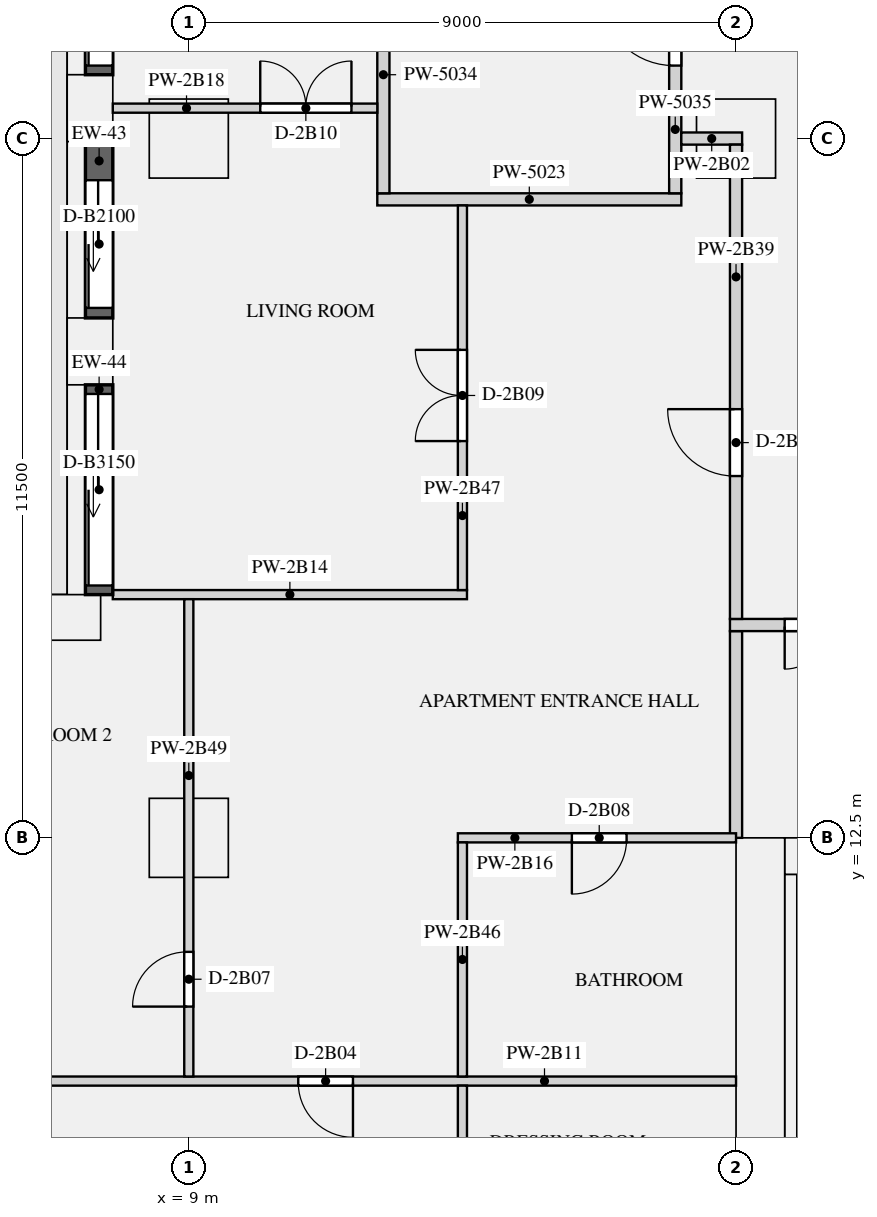
"""IFC4 building model, lengths in metres.
Left out: names, types, materials, properties, quantities, classifications, styles, units other than length and angle.
Written with IfcOpenShell. Run it as: python <this file> out.ifc"""

import sys

from ifc_helpers import new_model, si_unit, direction, frame, frame_2d, origin, origin_2d, place, context, subcontext, project, spatial, rectangle, extrude, element, fill, save


model = new_model("IFC4")
c1 = context("Model", 3, precision=1e-05, world=origin(), true_north=direction((0.0, 1.0)))
c2 = subcontext(c1, "Body", "Model", "MODEL_VIEW")
j1 = project(units=[si_unit("LENGTHUNIT", "METRE"), si_unit("PLANEANGLEUNIT", "RADIAN")], contexts=[c1])
p1 = place(None, origin())
s1 = spatial("IfcSite", under=j1, at=p1, CompositionType="ELEMENT")
p2 = place(p1, origin())
s2 = spatial("IfcBuilding", under=s1, at=p2, CompositionType="ELEMENT")
p3 = place(p2, frame((0.0, 0.0, 93.0)))
s3 = spatial("IfcBuildingStorey", under=s2, at=p3, CompositionType="ELEMENT", Elevation=93.0)
for number, where, z_axis, x_axis in (
    (1, (7.375, 24.5, 0.0), (0.0, 0.0, 1.0), (0.0, -1.0, 0.0)),
    (2, (7.375, 20.5, 0.0), (0.0, 0.0, 1.0), (0.0, -1.0, 0.0)),
    (3, (7.0, 16.125, 0.0), (0.0, 0.0, 1.0), (-1.0, 0.0, 0.0)),
):
    element("IfcColumn", number, at=place(p3, frame(where, z_axis=z_axis, x_axis=x_axis)), inside=s3, PredefinedType="USERDEFINED", context=c2, shape_type="SweptSolid", body=[
        extrude(rectangle(XDim=1.1, YDim=0.75, at=origin_2d()), origin(), (0.0, 0.0, 1.0), 3.15),
    ])
for number, where, z_axis, x_axis in (
    (4, (9.0, 24.0, 0.0), (0.0, 0.0, 1.0), (1.0, 0.0, 0.0)),
    (5, (18.0, 24.0, 0.0), (0.0, 0.0, 1.0), (1.0, 0.0, 0.0)),
    (6, (9.0, 12.5, 0.0), (0.0, 0.0, 1.0), (1.0, 0.0, 0.0)),
):
    element("IfcColumn", number, at=place(p3, frame(where, z_axis=z_axis, x_axis=x_axis)), inside=s3, PredefinedType="COLUMN", context=c2, shape_type="SweptSolid", body=[
        extrude(rectangle(XDim=1.3, YDim=1.3, at=origin_2d()), origin(), (0.0, 0.0, 1.0), 3.15),
    ])
p4 = place(p3, frame((18.4, 0.0, 0.0), z_axis=(0.0, 0.0, 1.0), x_axis=(0.0, 1.0, 0.0)))
e7 = element("IfcWall", 7, at=p4, inside=s3, PredefinedType="SHEAR", context=c2, shape_type="SweptSolid", body=[
    extrude(rectangle(XDim=12.5, YDim=0.8, at=frame_2d((6.25, 0.0))), origin(), (0.0, 0.0, 1.0), 3.15),
])
p5 = place(p3, frame((18.8, 12.2, 0.0), z_axis=(0.0, 0.0, 1.0), x_axis=(1.0, 0.0, 0.0)))
e8 = element("IfcWall", 8, at=p5, inside=s3, PredefinedType="SHEAR", context=c2, shape_type="SweptSolid", body=[
    extrude(rectangle(XDim=34.4, YDim=0.6, at=frame_2d((17.2, 0.0))), origin(), (0.0, 0.0, 1.0), 3.15),
])
p6 = place(p5, frame((24.375, 0.0, 0.0)))
e9 = element("IfcOpeningElement", 9, at=p6, cuts=e8, PredefinedType="OPENING", context=c2, shape_type="SweptSolid", body=[
    extrude(rectangle(XDim=1.1, YDim=2.1, at=frame_2d((0.55, 1.05))), frame((0.0, 0.31, 0.0), z_axis=(0.0, -1.0, 0.0), x_axis=(1.0, 0.0, 0.0)), (0.0, 0.0, 1.0), 0.62),
])
p7 = place(p5, frame((26.625, 0.0, 0.0)))
e10 = element("IfcOpeningElement", 10, at=p7, cuts=e8, PredefinedType="OPENING", context=c2, shape_type="SweptSolid", body=[
    extrude(rectangle(XDim=1.1, YDim=2.1, at=frame_2d((0.55, 1.05))), frame((0.0, 0.31, 0.0), z_axis=(0.0, -1.0, 0.0), x_axis=(1.0, 0.0, 0.0)), (0.0, 0.0, 1.0), 0.62),
])
p8 = place(p5, frame((28.875, 0.0, 0.0)))
e11 = element("IfcOpeningElement", 11, at=p8, cuts=e8, PredefinedType="OPENING", context=c2, shape_type="SweptSolid", body=[
    extrude(rectangle(XDim=1.1, YDim=2.1, at=frame_2d((0.55, 1.05))), frame((0.0, 0.31, 0.0), z_axis=(0.0, -1.0, 0.0), x_axis=(1.0, 0.0, 0.0)), (0.0, 0.0, 1.0), 0.62),
])
p9 = place(p5, frame((4.75, 0.0, 0.0)))
e12 = element("IfcOpeningElement", 12, at=p9, cuts=e8, PredefinedType="OPENING", context=c2, shape_type="SweptSolid", body=[
    extrude(rectangle(XDim=0.9, YDim=2.1, at=frame_2d((0.45, 1.05))), frame((0.0, 0.31, 0.0), z_axis=(0.0, -1.0, 0.0), x_axis=(1.0, 0.0, 0.0)), (0.0, 0.0, 1.0), 0.62),
])
p10 = place(p5, frame((18.25, 0.0, 0.0)))
e13 = element("IfcOpeningElement", 13, at=p10, cuts=e8, PredefinedType="OPENING", context=c2, shape_type="SweptSolid", body=[
    extrude(rectangle(XDim=0.9, YDim=2.1, at=frame_2d((0.45, 1.05))), frame((0.0, 0.31, 0.0), z_axis=(0.0, -1.0, 0.0), x_axis=(1.0, 0.0, 0.0)), (0.0, 0.0, 1.0), 0.62),
])
p11 = place(p5, frame((1.35, 0.0, 0.0)))
e14 = element("IfcOpeningElement", 14, at=p11, cuts=e8, PredefinedType="OPENING", context=c2, shape_type="SweptSolid", body=[
    extrude(rectangle(XDim=1.2, YDim=2.1, at=frame_2d((0.6, 1.05))), frame((0.0, 0.31, 0.0), z_axis=(0.0, -1.0, 0.0), x_axis=(1.0, 0.0, 0.0)), (0.0, 0.0, 1.0), 0.62),
])
p12 = place(p5, frame((31.85, 0.0, 0.0)))
e15 = element("IfcOpeningElement", 15, at=p12, cuts=e8, PredefinedType="OPENING", context=c2, shape_type="SweptSolid", body=[
    extrude(rectangle(XDim=1.2, YDim=2.1, at=frame_2d((0.6, 1.05))), frame((0.0, 0.31, 0.0), z_axis=(0.0, -1.0, 0.0), x_axis=(1.0, 0.0, 0.0)), (0.0, 0.0, 1.0), 0.62),
])
p13 = place(p3, frame((18.9, 1.0, 0.0), z_axis=(0.0, 0.0, 1.0), x_axis=(0.0, 1.0, 0.0)))
e16 = element("IfcWall", 16, at=p13, inside=s3, PredefinedType="SHEAR", context=c2, shape_type="SweptSolid", body=[
    extrude(rectangle(XDim=10.9, YDim=0.2, at=frame_2d((5.45, 0.0))), origin(), (0.0, 0.0, 1.0), 3.15),
])
p14 = place(p3, frame((7.525, 27.95, 0.0), z_axis=(0.0, 0.0, 1.0), x_axis=(0.0, -1.0, 0.0)))
e17 = element("IfcWall", 17, at=p14, inside=s3, PredefinedType="SOLIDWALL", context=c2, shape_type="SweptSolid", body=[
    extrude(rectangle(XDim=2.9, YDim=0.45, at=frame_2d((1.45, 0.0))), origin(), (0.0, 0.0, 1.0), 2.83),
])
p15 = place(p14, frame((0.15, 0.0, 0.0)))
e18 = element("IfcOpeningElement", 18, at=p15, cuts=e17, PredefinedType="OPENING", context=c2, shape_type="SweptSolid", body=[
    extrude(rectangle(XDim=2.6, YDim=2.3, at=frame_2d((1.3, 1.15))), frame((0.0, 0.235, 0.0), z_axis=(0.0, -1.0, 0.0), x_axis=(1.0, 0.0, 0.0)), (0.0, 0.0, 1.0), 0.47),
])
p16 = place(p3, frame((7.525, 23.95, 0.0), z_axis=(0.0, 0.0, 1.0), x_axis=(0.0, -1.0, 0.0)))
e19 = element("IfcWall", 19, at=p16, inside=s3, PredefinedType="SOLIDWALL", context=c2, shape_type="SweptSolid", body=[
    extrude(rectangle(XDim=2.9, YDim=0.45, at=frame_2d((1.45, 0.0))), origin(), (0.0, 0.0, 1.0), 2.83),
])
p17 = place(p16, frame((0.635, 0.0, 0.0)))
e20 = element("IfcOpeningElement", 20, at=p17, cuts=e19, PredefinedType="OPENING", context=c2, shape_type="SweptSolid", body=[
    extrude(rectangle(XDim=2.1, YDim=2.3, at=frame_2d((1.05, 1.15))), frame((0.0, 0.235, 0.0), z_axis=(0.0, -1.0, 0.0), x_axis=(1.0, 0.0, 0.0)), (0.0, 0.0, 1.0), 0.47),
])
p18 = place(p3, frame((7.525, 19.95, 0.0), z_axis=(0.0, 0.0, 1.0), x_axis=(0.0, -1.0, 0.0)))
e21 = element("IfcWall", 21, at=p18, inside=s3, PredefinedType="SOLIDWALL", context=c2, shape_type="SweptSolid", body=[
    extrude(rectangle(XDim=3.45, YDim=0.45, at=frame_2d((1.725, 0.0))), origin(), (0.0, 0.0, 1.0), 2.83),
])
p19 = place(p18, frame((0.15, 0.0, 0.0)))
e22 = element("IfcOpeningElement", 22, at=p19, cuts=e21, PredefinedType="OPENING", context=c2, shape_type="SweptSolid", body=[
    extrude(rectangle(XDim=3.15, YDim=2.3, at=frame_2d((1.575, 1.15))), frame((0.0, 0.235, 0.0), z_axis=(0.0, -1.0, 0.0), x_axis=(1.0, 0.0, 0.0)), (0.0, 0.0, 1.0), 0.47),
])
p20 = place(p3, frame((12.1, 23.0, 0.0), z_axis=(0.0, 0.0, 1.0), x_axis=(1.0, 0.0, 0.0)))
e23 = element("IfcWall", 23, at=p20, inside=s3, PredefinedType="PARTITIONING", context=c2, shape_type="SweptSolid", body=[
    extrude(rectangle(XDim=5.0, YDim=0.2, at=frame_2d((2.5, 0.0))), origin(), (0.0, 0.0, 1.0), 2.83),
])
p21 = place(p3, frame((18.0, 12.5, 0.0), z_axis=(0.0, 0.0, 1.0), x_axis=(0.0, 1.0, 0.0)))
e24 = element("IfcWall", 24, at=p21, inside=s3, PredefinedType="PARTITIONING", context=c2, shape_type="SweptSolid", body=[
    extrude(rectangle(XDim=3.4, YDim=0.2, at=frame_2d((1.7, 0.0))), origin(), (0.0, 0.0, 1.0), 2.83),
])
p22 = place(p3, frame((12.2, 23.1, 0.0), z_axis=(0.0, 0.0, 1.0), x_axis=(0.0, 1.0, 0.0)))
e25 = element("IfcWall", 25, at=p22, inside=s3, PredefinedType="PARTITIONING", context=c2, shape_type="SweptSolid", body=[
    extrude(rectangle(XDim=3.9, YDim=0.2, at=frame_2d((1.95, 0.0))), origin(), (0.0, 0.0, 1.0), 2.83),
])
p23 = place(p3, frame((17.0, 23.1, 0.0), z_axis=(0.0, 0.0, 1.0), x_axis=(0.0, 1.0, 0.0)))
e26 = element("IfcWall", 26, at=p23, inside=s3, PredefinedType="PARTITIONING", context=c2, shape_type="SweptSolid", body=[
    extrude(rectangle(XDim=3.8, YDim=0.2, at=frame_2d((1.9, 0.0))), origin(), (0.0, 0.0, 1.0), 2.83),
])
p24 = place(p23, frame((2.1, 0.0, 0.0)))
e27 = element("IfcOpeningElement", 27, at=p24, cuts=e26, PredefinedType="OPENING", context=c2, shape_type="SweptSolid", body=[
    extrude(rectangle(XDim=1.2, YDim=2.1, at=frame_2d((0.6, 1.05))), frame((0.0, 0.11, 0.0), z_axis=(0.0, -1.0, 0.0), x_axis=(1.0, 0.0, 0.0)), (0.0, 0.0, 1.0), 0.22),
])
p25 = place(p3, frame((17.1, 24.0, 0.0), z_axis=(0.0, 0.0, 1.0), x_axis=(1.0, 0.0, 0.0)))
e28 = element("IfcWall", 28, at=p25, inside=s3, PredefinedType="PARTITIONING", context=c2, shape_type="SweptSolid", body=[
    extrude(rectangle(XDim=1.0, YDim=0.2, at=frame_2d((0.5, 0.0))), origin(), (0.0, 0.0, 1.0), 2.83),
])
p26 = place(p3, frame((5.25, 8.5, 0.0), z_axis=(0.0, 0.0, 1.0), x_axis=(1.0, 0.0, 0.0)))
e29 = element("IfcWall", 29, at=p26, inside=s3, PredefinedType="PARTITIONING", context=c2, shape_type="SweptSolid", body=[
    extrude(rectangle(XDim=12.75, YDim=0.15, at=frame_2d((6.375, 0.0))), origin(), (0.0, 0.0, 1.0), 2.83),
])
p27 = place(p26, frame((5.55, 0.0, 0.0)))
e30 = element("IfcOpeningElement", 30, at=p27, cuts=e29, PredefinedType="OPENING", context=c2, shape_type="SweptSolid", body=[
    extrude(rectangle(XDim=0.9, YDim=2.1, at=frame_2d((0.45, 1.05))), frame((0.0, 0.085, 0.0), z_axis=(0.0, -1.0, 0.0), x_axis=(1.0, 0.0, 0.0)), (0.0, 0.0, 1.0), 0.17),
])
p28 = place(p3, frame((7.75, 16.5, 0.0), z_axis=(0.0, 0.0, 1.0), x_axis=(1.0, 0.0, 0.0)))
e31 = element("IfcWall", 31, at=p28, inside=s3, PredefinedType="PARTITIONING", context=c2, shape_type="SweptSolid", body=[
    extrude(rectangle(XDim=5.825, YDim=0.15, at=frame_2d((2.913, 0.0))), origin(), (0.0, 0.0, 1.0), 2.83),
])
p29 = place(p3, frame((13.425, 12.5, 0.0), z_axis=(0.0, 0.0, 1.0), x_axis=(1.0, 0.0, 0.0)))
e32 = element("IfcWall", 32, at=p29, inside=s3, PredefinedType="PARTITIONING", context=c2, shape_type="SweptSolid", body=[
    extrude(rectangle(XDim=4.575, YDim=0.15, at=frame_2d((2.288, 0.0))), origin(), (0.0, 0.0, 1.0), 2.83),
])
p30 = place(p29, frame((1.875, 0.0, 0.0)))
e33 = element("IfcOpeningElement", 33, at=p30, cuts=e32, PredefinedType="OPENING", context=c2, shape_type="SweptSolid", body=[
    extrude(rectangle(XDim=0.9, YDim=2.1, at=frame_2d((0.45, 1.05))), frame((0.0, 0.085, 0.0), z_axis=(0.0, -1.0, 0.0), x_axis=(1.0, 0.0, 0.0)), (0.0, 0.0, 1.0), 0.17),
])
p31 = place(p3, frame((7.75, 24.5, 0.0), z_axis=(0.0, 0.0, 1.0), x_axis=(1.0, 0.0, 0.0)))
e34 = element("IfcWall", 34, at=p31, inside=s3, PredefinedType="PARTITIONING", context=c2, shape_type="SweptSolid", body=[
    extrude(rectangle(XDim=4.35, YDim=0.15, at=frame_2d((2.175, 0.0))), origin(), (0.0, 0.0, 1.0), 2.83),
])
p32 = place(p31, frame((2.425, 0.0, 0.0)))
e35 = element("IfcOpeningElement", 35, at=p32, cuts=e34, PredefinedType="OPENING", context=c2, shape_type="SweptSolid", body=[
    extrude(rectangle(XDim=1.5, YDim=2.1, at=frame_2d((0.75, 1.05))), frame((0.0, 0.085, 0.0), z_axis=(0.0, -1.0, 0.0), x_axis=(1.0, 0.0, 0.0)), (0.0, 0.0, 1.0), 0.17),
])
p33 = place(p3, frame((17.9, 16.0, 0.0), z_axis=(0.0, 0.0, 1.0), x_axis=(1.0, 0.0, 0.0)))
e36 = element("IfcWall", 36, at=p33, inside=s3, PredefinedType="PARTITIONING", context=c2, shape_type="SweptSolid", body=[
    extrude(rectangle(XDim=36.2, YDim=0.2, at=frame_2d((18.1, 0.0))), origin(), (0.0, 0.0, 1.0), 2.83),
])
p34 = place(p33, frame((0.9, 0.0, 0.0)))
e37 = element("IfcOpeningElement", 37, at=p34, cuts=e36, PredefinedType="OPENING", context=c2, shape_type="SweptSolid", body=[
    extrude(rectangle(XDim=1.4, YDim=2.1, at=frame_2d((0.7, 1.05))), frame((0.0, 0.11, 0.0), z_axis=(0.0, -1.0, 0.0), x_axis=(1.0, 0.0, 0.0)), (0.0, 0.0, 1.0), 0.22),
])
p35 = place(p33, frame((33.9, 0.0, 0.0)))
e38 = element("IfcOpeningElement", 38, at=p35, cuts=e36, PredefinedType="OPENING", context=c2, shape_type="SweptSolid", body=[
    extrude(rectangle(XDim=1.4, YDim=2.1, at=frame_2d((0.7, 1.05))), frame((0.0, 0.11, 0.0), z_axis=(0.0, -1.0, 0.0), x_axis=(1.0, 0.0, 0.0)), (0.0, 0.0, 1.0), 0.22),
])
p36 = place(p3, frame((18.0, 16.1, 0.0), z_axis=(0.0, 0.0, 1.0), x_axis=(0.0, 1.0, 0.0)))
e39 = element("IfcWall", 39, at=p36, inside=s3, PredefinedType="PARTITIONING", context=c2, shape_type="SweptSolid", body=[
    extrude(rectangle(XDim=7.8, YDim=0.2, at=frame_2d((3.9, 0.0))), origin(), (0.0, 0.0, 1.0), 2.83),
])
p37 = place(p36, frame((2.35, 0.0, 0.0)))
e40 = element("IfcOpeningElement", 40, at=p37, cuts=e39, PredefinedType="OPENING", context=c2, shape_type="SweptSolid", body=[
    extrude(rectangle(XDim=1.1, YDim=2.1, at=frame_2d((0.55, 1.05))), frame((0.0, 0.11, 0.0), z_axis=(0.0, -1.0, 0.0), x_axis=(1.0, 0.0, 0.0)), (0.0, 0.0, 1.0), 0.22),
])
p38 = place(p3, frame((13.5, 0.75, 0.0), z_axis=(0.0, 0.0, 1.0), x_axis=(0.0, 1.0, 0.0)))
e41 = element("IfcWall", 41, at=p38, inside=s3, PredefinedType="PARTITIONING", context=c2, shape_type="SweptSolid", body=[
    extrude(rectangle(XDim=7.675, YDim=0.15, at=frame_2d((3.837, 0.0))), origin(), (0.0, 0.0, 1.0), 2.83),
])
p39 = place(p38, frame((1.25, 0.0, 0.0)))
e42 = element("IfcOpeningElement", 42, at=p39, cuts=e41, PredefinedType="OPENING", context=c2, shape_type="SweptSolid", body=[
    extrude(rectangle(XDim=0.9, YDim=2.1, at=frame_2d((0.45, 1.05))), frame((0.0, 0.085, 0.0), z_axis=(0.0, -1.0, 0.0), x_axis=(1.0, 0.0, 0.0)), (0.0, 0.0, 1.0), 0.17),
])
p40 = place(p38, frame((5.2, 0.0, 0.0)))
e43 = element("IfcOpeningElement", 43, at=p40, cuts=e41, PredefinedType="OPENING", context=c2, shape_type="SweptSolid", body=[
    extrude(rectangle(XDim=0.9, YDim=2.1, at=frame_2d((0.45, 1.05))), frame((0.0, 0.085, 0.0), z_axis=(0.0, -1.0, 0.0), x_axis=(1.0, 0.0, 0.0)), (0.0, 0.0, 1.0), 0.17),
])
p41 = place(p3, frame((13.5, 8.575, 0.0), z_axis=(0.0, 0.0, 1.0), x_axis=(0.0, 1.0, 0.0)))
e44 = element("IfcWall", 44, at=p41, inside=s3, PredefinedType="PARTITIONING", context=c2, shape_type="SweptSolid", body=[
    extrude(rectangle(XDim=3.85, YDim=0.15, at=frame_2d((1.925, 0.0))), origin(), (0.0, 0.0, 1.0), 2.83),
])
p42 = place(p3, frame((13.5, 16.575, 0.0), z_axis=(0.0, 0.0, 1.0), x_axis=(0.0, 1.0, 0.0)))
e45 = element("IfcWall", 45, at=p42, inside=s3, PredefinedType="PARTITIONING", context=c2, shape_type="SweptSolid", body=[
    extrude(rectangle(XDim=6.325, YDim=0.15, at=frame_2d((3.163, 0.0))), origin(), (0.0, 0.0, 1.0), 2.83),
])
p43 = place(p42, frame((2.45, 0.0, 0.0)))
e46 = element("IfcOpeningElement", 46, at=p43, cuts=e45, PredefinedType="OPENING", context=c2, shape_type="SweptSolid", body=[
    extrude(rectangle(XDim=1.5, YDim=2.1, at=frame_2d((0.75, 1.05))), frame((0.0, 0.085, 0.0), z_axis=(0.0, -1.0, 0.0), x_axis=(1.0, 0.0, 0.0)), (0.0, 0.0, 1.0), 0.17),
])
p44 = place(p3, frame((9.0, 8.575, 0.0), z_axis=(0.0, 0.0, 1.0), x_axis=(0.0, 1.0, 0.0)))
e47 = element("IfcWall", 47, at=p44, inside=s3, PredefinedType="PARTITIONING", context=c2, shape_type="SweptSolid", body=[
    extrude(rectangle(XDim=7.85, YDim=0.15, at=frame_2d((3.925, 0.0))), origin(), (0.0, 0.0, 1.0), 2.83),
])
p45 = place(p44, frame((1.15, 0.0, 0.0)))
e48 = element("IfcOpeningElement", 48, at=p45, cuts=e47, PredefinedType="OPENING", context=c2, shape_type="SweptSolid", body=[
    extrude(rectangle(XDim=0.9, YDim=2.1, at=frame_2d((0.45, 1.05))), frame((0.0, 0.085, 0.0), z_axis=(0.0, -1.0, 0.0), x_axis=(1.0, 0.0, 0.0)), (0.0, 0.0, 1.0), 0.17),
])
p46 = place(p15, origin())
e49 = element("IfcDoor", 49, at=p46, inside=s3, OperationType="SLIDING_TO_LEFT", PredefinedType="DOOR", context=c2, shape_type="SweptSolid", body=[
    extrude(rectangle(XDim=2.6, YDim=2.3, at=frame_2d((1.3, 1.15))), frame((0.0, -0.07, 0.0), z_axis=(0.0, -1.0, 0.0), x_axis=(1.0, 0.0, 0.0)), (0.0, 0.0, 1.0), 0.05),
])
fill(e18, e49)
p47 = place(p17, origin())
e50 = element("IfcDoor", 50, at=p47, inside=s3, OperationType="SLIDING_TO_LEFT", PredefinedType="DOOR", context=c2, shape_type="SweptSolid", body=[
    extrude(rectangle(XDim=2.1, YDim=2.3, at=frame_2d((1.05, 1.15))), frame((0.0, -0.07, 0.0), z_axis=(0.0, -1.0, 0.0), x_axis=(1.0, 0.0, 0.0)), (0.0, 0.0, 1.0), 0.05),
])
fill(e20, e50)
p48 = place(p19, origin())
e51 = element("IfcDoor", 51, at=p48, inside=s3, OperationType="SLIDING_TO_LEFT", PredefinedType="DOOR", context=c2, shape_type="SweptSolid", body=[
    extrude(rectangle(XDim=3.15, YDim=2.3, at=frame_2d((1.575, 1.15))), frame((0.0, -0.07, 0.0), z_axis=(0.0, -1.0, 0.0), x_axis=(1.0, 0.0, 0.0)), (0.0, 0.0, 1.0), 0.05),
])
fill(e22, e51)
p49 = place(p24, origin())
e52 = element("IfcDoor", 52, at=p49, inside=s3, OperationType="SINGLE_SWING_RIGHT", PredefinedType="DOOR", context=c2, shape_type="SweptSolid", body=[
    extrude(rectangle(XDim=1.2, YDim=2.1, at=frame_2d((0.6, 1.05))), frame((0.0, 0.025, 0.0), z_axis=(0.0, -1.0, 0.0), x_axis=(1.0, 0.0, 0.0)), (0.0, 0.0, 1.0), 0.05),
])
fill(e27, e52)
p50 = place(p34, frame((1.4, 0.0, 0.0), z_axis=(0.0, 0.0, 1.0), x_axis=(-1.0, 0.0, 0.0)))
e53 = element("IfcDoor", 53, at=p50, inside=s3, OperationType="DOUBLE_DOOR_SINGLE_SWING", PredefinedType="DOOR", context=c2, shape_type="SweptSolid", body=[
    extrude(rectangle(XDim=1.4, YDim=2.1, at=frame_2d((0.7, 1.05))), frame((0.0, 0.025, 0.0), z_axis=(0.0, -1.0, 0.0), x_axis=(1.0, 0.0, 0.0)), (0.0, 0.0, 1.0), 0.05),
])
fill(e37, e53)
p51 = place(p37, origin())
e54 = element("IfcDoor", 54, at=p51, inside=s3, OperationType="SINGLE_SWING_RIGHT", PredefinedType="DOOR", context=c2, shape_type="SweptSolid", body=[
    extrude(rectangle(XDim=1.1, YDim=2.1, at=frame_2d((0.55, 1.05))), frame((0.0, 0.025, 0.0), z_axis=(0.0, -1.0, 0.0), x_axis=(1.0, 0.0, 0.0)), (0.0, 0.0, 1.0), 0.05),
])
fill(e40, e54)
p52 = place(p27, frame((0.9, 0.0, 0.0), z_axis=(0.0, 0.0, 1.0), x_axis=(-1.0, 0.0, 0.0)))
e55 = element("IfcDoor", 55, at=p52, inside=s3, OperationType="SINGLE_SWING_LEFT", PredefinedType="DOOR", context=c2, shape_type="SweptSolid", body=[
    extrude(rectangle(XDim=0.9, YDim=2.1, at=frame_2d((0.45, 1.05))), frame((0.0, 0.025, 0.0), z_axis=(0.0, -1.0, 0.0), x_axis=(1.0, 0.0, 0.0)), (0.0, 0.0, 1.0), 0.05),
])
fill(e30, e55)
p53 = place(p45, origin())
e56 = element("IfcDoor", 56, at=p53, inside=s3, OperationType="SINGLE_SWING_LEFT", PredefinedType="DOOR", context=c2, shape_type="SweptSolid", body=[
    extrude(rectangle(XDim=0.9, YDim=2.1, at=frame_2d((0.45, 1.05))), frame((0.0, 0.025, 0.0), z_axis=(0.0, -1.0, 0.0), x_axis=(1.0, 0.0, 0.0)), (0.0, 0.0, 1.0), 0.05),
])
fill(e48, e56)
p54 = place(p30, frame((0.9, 0.0, 0.0), z_axis=(0.0, 0.0, 1.0), x_axis=(-1.0, 0.0, 0.0)))
e57 = element("IfcDoor", 57, at=p54, inside=s3, OperationType="SINGLE_SWING_RIGHT", PredefinedType="DOOR", context=c2, shape_type="SweptSolid", body=[
    extrude(rectangle(XDim=0.9, YDim=2.1, at=frame_2d((0.45, 1.05))), frame((0.0, 0.025, 0.0), z_axis=(0.0, -1.0, 0.0), x_axis=(1.0, 0.0, 0.0)), (0.0, 0.0, 1.0), 0.05),
])
fill(e33, e57)
p55 = place(p43, origin())
e58 = element("IfcDoor", 58, at=p55, inside=s3, OperationType="DOUBLE_DOOR_SINGLE_SWING", PredefinedType="DOOR", context=c2, shape_type="SweptSolid", body=[
    extrude(rectangle(XDim=1.5, YDim=2.1, at=frame_2d((0.75, 1.05))), frame((0.0, 0.025, 0.0), z_axis=(0.0, -1.0, 0.0), x_axis=(1.0, 0.0, 0.0)), (0.0, 0.0, 1.0), 0.05),
])
fill(e46, e58)
p56 = place(p32, origin())
e59 = element("IfcDoor", 59, at=p56, inside=s3, OperationType="DOUBLE_DOOR_SINGLE_SWING", PredefinedType="DOOR", context=c2, shape_type="SweptSolid", body=[
    extrude(rectangle(XDim=1.5, YDim=2.1, at=frame_2d((0.75, 1.05))), frame((0.0, 0.025, 0.0), z_axis=(0.0, -1.0, 0.0), x_axis=(1.0, 0.0, 0.0)), (0.0, 0.0, 1.0), 0.05),
])
fill(e35, e59)
save(model, sys.argv[1])
